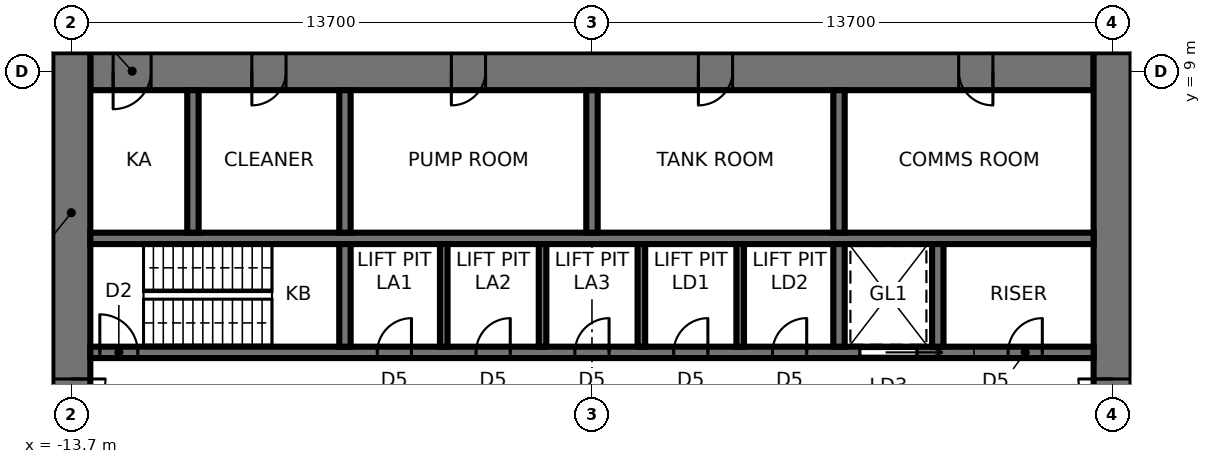
"""IFC4 building model, lengths in metres.
Left out: names, types, materials, properties, quantities, classifications, styles, units other than length and angle.
Written with IfcOpenShell. Run it as: python <this file> out.ifc"""

import sys

from ifc_helpers import new_model, si_unit, direction, frame, frame_2d, origin, place, context, subcontext, project, spatial, rectangle, extrude, element, fill, save


model = new_model("IFC4")
c1 = context("Model", 3, precision=1e-05, world=origin(), true_north=direction((0.0, 1.0)))
c2 = subcontext(c1, "Body", "Model", "MODEL_VIEW")
j1 = project(units=[si_unit("LENGTHUNIT", "METRE"), si_unit("PLANEANGLEUNIT", "RADIAN")], contexts=[c1])
p1 = place(None, origin())
s1 = spatial("IfcSite", under=j1, at=p1, CompositionType="ELEMENT")
p2 = place(p1, origin())
s2 = spatial("IfcBuilding", under=s1, at=p2, CompositionType="ELEMENT")
p3 = place(p2, frame((0.0, 0.0, -5.0)))
s3 = spatial("IfcBuildingStorey", under=s2, at=p3, CompositionType="ELEMENT", Elevation=-5.0)
p4 = place(p3, frame((13.2, 9.0, -0.15), z_axis=(0.0, 0.0, 1.0), x_axis=(-1.0, 0.0, 0.0)))
e1 = element("IfcWall", 1, at=p4, inside=s3, PredefinedType="SHEAR", context=c2, shape_type="SweptSolid", body=[
    extrude(rectangle(XDim=26.4, YDim=1.0, at=frame_2d((13.2, 0.0))), origin(), (0.0, 0.0, 1.0), 5.15),
])
p5 = place(p4, frame((2.65, 0.0, 0.15)))
e2 = element("IfcOpeningElement", 2, at=p5, cuts=e1, PredefinedType="OPENING", context=c2, shape_type="SweptSolid", body=[
    extrude(rectangle(XDim=0.9, YDim=2.1, at=frame_2d((0.45, 1.05))), frame((0.0, 0.51, 0.0), z_axis=(0.0, -1.0, 0.0), x_axis=(1.0, 0.0, 0.0)), (0.0, 0.0, 1.0), 1.02),
])
p6 = place(p4, frame((9.5, 0.0, 0.15)))
e3 = element("IfcOpeningElement", 3, at=p6, cuts=e1, PredefinedType="OPENING", context=c2, shape_type="SweptSolid", body=[
    extrude(rectangle(XDim=0.9, YDim=2.1, at=frame_2d((0.45, 1.05))), frame((0.0, 0.51, 0.0), z_axis=(0.0, -1.0, 0.0), x_axis=(1.0, 0.0, 0.0)), (0.0, 0.0, 1.0), 1.02),
])
p7 = place(p4, frame((16.0, 0.0, 0.15)))
e4 = element("IfcOpeningElement", 4, at=p7, cuts=e1, PredefinedType="OPENING", context=c2, shape_type="SweptSolid", body=[
    extrude(rectangle(XDim=0.9, YDim=2.1, at=frame_2d((0.45, 1.05))), frame((0.0, 0.51, 0.0), z_axis=(0.0, -1.0, 0.0), x_axis=(1.0, 0.0, 0.0)), (0.0, 0.0, 1.0), 1.02),
])
p8 = place(p4, frame((21.25, 0.0, 0.15)))
e5 = element("IfcOpeningElement", 5, at=p8, cuts=e1, PredefinedType="OPENING", context=c2, shape_type="SweptSolid", body=[
    extrude(rectangle(XDim=0.9, YDim=2.1, at=frame_2d((0.45, 1.05))), frame((0.0, 0.51, 0.0), z_axis=(0.0, -1.0, 0.0), x_axis=(1.0, 0.0, 0.0)), (0.0, 0.0, 1.0), 1.02),
])
p9 = place(p4, frame((24.8, 0.0, 0.15)))
e6 = element("IfcOpeningElement", 6, at=p9, cuts=e1, PredefinedType="OPENING", context=c2, shape_type="SweptSolid", body=[
    extrude(rectangle(XDim=1.0, YDim=2.1, at=frame_2d((0.5, 1.05))), frame((0.0, 0.51, 0.0), z_axis=(0.0, -1.0, 0.0), x_axis=(1.0, 0.0, 0.0)), (0.0, 0.0, 1.0), 1.02),
])
p10 = place(p3, frame((13.7, -9.5, -0.15), z_axis=(0.0, 0.0, 1.0), x_axis=(0.0, 1.0, 0.0)))
e7 = element("IfcWall", 7, at=p10, inside=s3, PredefinedType="SHEAR", context=c2, shape_type="SweptSolid", body=[
    extrude(rectangle(XDim=19.0, YDim=1.0, at=frame_2d((9.5, 0.0))), origin(), (0.0, 0.0, 1.0), 5.15),
])
p11 = place(p10, frame((8.6, 0.0, 0.15)))
e8 = element("IfcOpeningElement", 8, at=p11, cuts=e7, PredefinedType="OPENING", context=c2, shape_type="SweptSolid", body=[
    extrude(rectangle(XDim=1.8, YDim=2.4, at=frame_2d((0.9, 1.2))), frame((0.0, 0.51, 0.0), z_axis=(0.0, -1.0, 0.0), x_axis=(1.0, 0.0, 0.0)), (0.0, 0.0, 1.0), 1.02),
])
p12 = place(p3, frame((-13.7, 9.5, -0.15), z_axis=(0.0, 0.0, 1.0), x_axis=(0.0, -1.0, 0.0)))
e9 = element("IfcWall", 9, at=p12, inside=s3, PredefinedType="SHEAR", context=c2, shape_type="SweptSolid", body=[
    extrude(rectangle(XDim=19.0, YDim=1.0, at=frame_2d((9.5, 0.0))), origin(), (0.0, 0.0, 1.0), 5.15),
])
p13 = place(p12, frame((8.6, 0.0, 0.15)))
e10 = element("IfcOpeningElement", 10, at=p13, cuts=e9, PredefinedType="OPENING", context=c2, shape_type="SweptSolid", body=[
    extrude(rectangle(XDim=1.8, YDim=2.4, at=frame_2d((0.9, 1.2))), frame((0.0, 0.51, 0.0), z_axis=(0.0, -1.0, 0.0), x_axis=(1.0, 0.0, 0.0)), (0.0, 0.0, 1.0), 1.02),
])
p14 = place(p3, frame((-13.2, 1.6, -0.15), z_axis=(0.0, 0.0, 1.0), x_axis=(1.0, 0.0, 0.0)))
e11 = element("IfcWall", 11, at=p14, inside=s3, PredefinedType="SHEAR", context=c2, shape_type="SweptSolid", body=[
    extrude(rectangle(XDim=26.4, YDim=0.3, at=frame_2d((13.2, 0.0))), origin(), (0.0, 0.0, 1.0), 5.15),
])
p15 = place(p14, frame((0.25, 0.0, 0.15)))
e12 = element("IfcOpeningElement", 12, at=p15, cuts=e11, PredefinedType="OPENING", context=c2, shape_type="SweptSolid", body=[
    extrude(rectangle(XDim=1.0, YDim=2.1, at=frame_2d((0.5, 1.05))), frame((0.0, 0.16, 0.0), z_axis=(0.0, -1.0, 0.0), x_axis=(1.0, 0.0, 0.0)), (0.0, 0.0, 1.0), 0.32),
])
p16 = place(p14, frame((20.25, 0.0, 0.15)))
e13 = element("IfcOpeningElement", 13, at=p16, cuts=e11, PredefinedType="OPENING", context=c2, shape_type="SweptSolid", body=[
    extrude(rectangle(XDim=1.5, YDim=2.4, at=frame_2d((0.75, 1.2))), frame((0.0, 0.16, 0.0), z_axis=(0.0, -1.0, 0.0), x_axis=(1.0, 0.0, 0.0)), (0.0, 0.0, 1.0), 0.32),
])
p17 = place(p14, frame((7.55, 0.0, 0.15)))
e14 = element("IfcOpeningElement", 14, at=p17, cuts=e11, PredefinedType="OPENING", context=c2, shape_type="SweptSolid", body=[
    extrude(rectangle(XDim=0.9, YDim=2.1, at=frame_2d((0.45, 1.05))), frame((0.0, 0.16, 0.0), z_axis=(0.0, -1.0, 0.0), x_axis=(1.0, 0.0, 0.0)), (0.0, 0.0, 1.0), 0.32),
])
p18 = place(p14, frame((10.15, 0.0, 0.15)))
e15 = element("IfcOpeningElement", 15, at=p18, cuts=e11, PredefinedType="OPENING", context=c2, shape_type="SweptSolid", body=[
    extrude(rectangle(XDim=0.9, YDim=2.1, at=frame_2d((0.45, 1.05))), frame((0.0, 0.16, 0.0), z_axis=(0.0, -1.0, 0.0), x_axis=(1.0, 0.0, 0.0)), (0.0, 0.0, 1.0), 0.32),
])
p19 = place(p14, frame((12.75, 0.0, 0.15)))
e16 = element("IfcOpeningElement", 16, at=p19, cuts=e11, PredefinedType="OPENING", context=c2, shape_type="SweptSolid", body=[
    extrude(rectangle(XDim=0.9, YDim=2.1, at=frame_2d((0.45, 1.05))), frame((0.0, 0.16, 0.0), z_axis=(0.0, -1.0, 0.0), x_axis=(1.0, 0.0, 0.0)), (0.0, 0.0, 1.0), 0.32),
])
p20 = place(p14, frame((15.35, 0.0, 0.15)))
e17 = element("IfcOpeningElement", 17, at=p20, cuts=e11, PredefinedType="OPENING", context=c2, shape_type="SweptSolid", body=[
    extrude(rectangle(XDim=0.9, YDim=2.1, at=frame_2d((0.45, 1.05))), frame((0.0, 0.16, 0.0), z_axis=(0.0, -1.0, 0.0), x_axis=(1.0, 0.0, 0.0)), (0.0, 0.0, 1.0), 0.32),
])
p21 = place(p14, frame((17.95, 0.0, 0.15)))
e18 = element("IfcOpeningElement", 18, at=p21, cuts=e11, PredefinedType="OPENING", context=c2, shape_type="SweptSolid", body=[
    extrude(rectangle(XDim=0.9, YDim=2.1, at=frame_2d((0.45, 1.05))), frame((0.0, 0.16, 0.0), z_axis=(0.0, -1.0, 0.0), x_axis=(1.0, 0.0, 0.0)), (0.0, 0.0, 1.0), 0.32),
])
p22 = place(p14, frame((24.15, 0.0, 0.15)))
e19 = element("IfcOpeningElement", 19, at=p22, cuts=e11, PredefinedType="OPENING", context=c2, shape_type="SweptSolid", body=[
    extrude(rectangle(XDim=0.9, YDim=2.1, at=frame_2d((0.45, 1.05))), frame((0.0, 0.16, 0.0), z_axis=(0.0, -1.0, 0.0), x_axis=(1.0, 0.0, 0.0)), (0.0, 0.0, 1.0), 0.32),
])
p23 = place(p3, frame((-13.2, 4.6, -0.15), z_axis=(0.0, 0.0, 1.0), x_axis=(1.0, 0.0, 0.0)))
e20 = element("IfcWall", 20, at=p23, inside=s3, PredefinedType="SHEAR", context=c2, shape_type="SweptSolid", body=[
    extrude(rectangle(XDim=26.4, YDim=0.3, at=frame_2d((13.2, 0.0))), origin(), (0.0, 0.0, 1.0), 5.15),
])
p24 = place(p3, frame((-6.5, 1.75, -0.15), z_axis=(0.0, 0.0, 1.0), x_axis=(0.0, 1.0, 0.0)))
e21 = element("IfcWall", 21, at=p24, inside=s3, PredefinedType="SHEAR", context=c2, shape_type="SweptSolid", body=[
    extrude(rectangle(XDim=2.7, YDim=0.3, at=frame_2d((1.35, 0.0))), origin(), (0.0, 0.0, 1.0), 5.15),
])
p25 = place(p3, frame((-6.5, 4.75, -0.15), z_axis=(0.0, 0.0, 1.0), x_axis=(0.0, 1.0, 0.0)))
e22 = element("IfcWall", 22, at=p25, inside=s3, PredefinedType="SHEAR", context=c2, shape_type="SweptSolid", body=[
    extrude(rectangle(XDim=3.75, YDim=0.3, at=frame_2d((1.875, 0.0))), origin(), (0.0, 0.0, 1.0), 5.15),
])
p26 = place(p3, frame((6.5, 1.75, -0.15), z_axis=(0.0, 0.0, 1.0), x_axis=(0.0, 1.0, 0.0)))
e23 = element("IfcWall", 23, at=p26, inside=s3, PredefinedType="SHEAR", context=c2, shape_type="SweptSolid", body=[
    extrude(rectangle(XDim=2.7, YDim=0.3, at=frame_2d((1.35, 0.0))), origin(), (0.0, 0.0, 1.0), 5.15),
])
p27 = place(p3, frame((6.5, 4.75, -0.15), z_axis=(0.0, 0.0, 1.0), x_axis=(0.0, 1.0, 0.0)))
e24 = element("IfcWall", 24, at=p27, inside=s3, PredefinedType="SHEAR", context=c2, shape_type="SweptSolid", body=[
    extrude(rectangle(XDim=3.75, YDim=0.3, at=frame_2d((1.875, 0.0))), origin(), (0.0, 0.0, 1.0), 5.15),
])
for number, where, z_axis, x_axis in (
    (25, (-3.9, 1.75, -0.15), (0.0, 0.0, 1.0), (0.0, 1.0, 0.0)),
    (26, (-1.3, 1.75, -0.15), (0.0, 0.0, 1.0), (0.0, 1.0, 0.0)),
    (27, (1.3, 1.75, -0.15), (0.0, 0.0, 1.0), (0.0, 1.0, 0.0)),
    (28, (3.9, 1.75, -0.15), (0.0, 0.0, 1.0), (0.0, 1.0, 0.0)),
):
    element("IfcWall", number, at=place(p3, frame(where, z_axis=z_axis, x_axis=x_axis)), inside=s3, PredefinedType="SHEAR", context=c2, shape_type="SweptSolid", body=[
        extrude(rectangle(XDim=2.7, YDim=0.2, at=frame_2d((1.35, 0.0))), origin(), (0.0, 0.0, 1.0), 5.15),
    ])
for number, where, z_axis, x_axis in (
    (29, (0.0, 4.75, -0.15), (0.0, 0.0, 1.0), (0.0, 1.0, 0.0)),
    (30, (-10.5, 4.75, -0.15), (0.0, 0.0, 1.0), (0.0, 1.0, 0.0)),
):
    element("IfcWall", number, at=place(p3, frame(where, z_axis=z_axis, x_axis=x_axis)), inside=s3, PredefinedType="SHEAR", context=c2, shape_type="SweptSolid", body=[
        extrude(rectangle(XDim=3.75, YDim=0.3, at=frame_2d((1.875, 0.0))), origin(), (0.0, 0.0, 1.0), 5.15),
    ])
p28 = place(p3, frame((9.1, 1.75, -0.15), z_axis=(0.0, 0.0, 1.0), x_axis=(0.0, 1.0, 0.0)))
e31 = element("IfcWall", 31, at=p28, inside=s3, PredefinedType="SHEAR", context=c2, shape_type="SweptSolid", body=[
    extrude(rectangle(XDim=2.7, YDim=0.3, at=frame_2d((1.35, 0.0))), origin(), (0.0, 0.0, 1.0), 5.15),
])
p29 = place(p13, origin())
e32 = element("IfcDoor", 32, at=p29, inside=s3, OperationType="DOUBLE_DOOR_SINGLE_SWING", PredefinedType="DOOR", context=c2, shape_type="SweptSolid", body=[
    extrude(rectangle(XDim=1.72, YDim=2.36, at=frame_2d((0.9, 1.18))), frame((0.0, 0.025, 0.0), z_axis=(0.0, -1.0, 0.0), x_axis=(1.0, 0.0, 0.0)), (0.0, 0.0, 1.0), 0.05),
    extrude(rectangle(XDim=0.04, YDim=2.4, at=frame_2d((0.02, 1.2))), frame((0.0, 0.25, 0.0), z_axis=(0.0, -1.0, 0.0), x_axis=(1.0, 0.0, 0.0)), (0.0, 0.0, 1.0), 0.5),
    extrude(rectangle(XDim=0.04, YDim=2.4, at=frame_2d((1.78, 1.2))), frame((0.0, 0.25, 0.0), z_axis=(0.0, -1.0, 0.0), x_axis=(1.0, 0.0, 0.0)), (0.0, 0.0, 1.0), 0.5),
    extrude(rectangle(XDim=1.72, YDim=0.04, at=frame_2d((0.9, 2.38))), frame((0.0, 0.25, 0.0), z_axis=(0.0, -1.0, 0.0), x_axis=(1.0, 0.0, 0.0)), (0.0, 0.0, 1.0), 0.5),
])
fill(e10, e32)
p30 = place(p11, origin())
e33 = element("IfcDoor", 33, at=p30, inside=s3, OperationType="DOUBLE_DOOR_SINGLE_SWING", PredefinedType="DOOR", context=c2, shape_type="SweptSolid", body=[
    extrude(rectangle(XDim=1.72, YDim=2.36, at=frame_2d((0.9, 1.18))), frame((0.0, 0.025, 0.0), z_axis=(0.0, -1.0, 0.0), x_axis=(1.0, 0.0, 0.0)), (0.0, 0.0, 1.0), 0.05),
    extrude(rectangle(XDim=0.04, YDim=2.4, at=frame_2d((0.02, 1.2))), frame((0.0, 0.25, 0.0), z_axis=(0.0, -1.0, 0.0), x_axis=(1.0, 0.0, 0.0)), (0.0, 0.0, 1.0), 0.5),
    extrude(rectangle(XDim=0.04, YDim=2.4, at=frame_2d((1.78, 1.2))), frame((0.0, 0.25, 0.0), z_axis=(0.0, -1.0, 0.0), x_axis=(1.0, 0.0, 0.0)), (0.0, 0.0, 1.0), 0.5),
    extrude(rectangle(XDim=1.72, YDim=0.04, at=frame_2d((0.9, 2.38))), frame((0.0, 0.25, 0.0), z_axis=(0.0, -1.0, 0.0), x_axis=(1.0, 0.0, 0.0)), (0.0, 0.0, 1.0), 0.5),
])
fill(e8, e33)
p31 = place(p15, origin())
e34 = element("IfcDoor", 34, at=p31, inside=s3, OperationType="SINGLE_SWING_LEFT", PredefinedType="DOOR", context=c2, shape_type="SweptSolid", body=[
    extrude(rectangle(XDim=1.0, YDim=2.1, at=frame_2d((0.5, 1.05))), frame((0.0, 0.025, 0.0), z_axis=(0.0, -1.0, 0.0), x_axis=(1.0, 0.0, 0.0)), (0.0, 0.0, 1.0), 0.05),
])
fill(e12, e34)
p32 = place(p16, origin())
e35 = element("IfcDoor", 35, at=p32, inside=s3, OperationType="SLIDING_TO_RIGHT", PredefinedType="DOOR", context=c2, shape_type="SweptSolid", body=[
    extrude(rectangle(XDim=1.5, YDim=2.4, at=frame_2d((0.75, 1.2))), frame((0.0, 0.025, 0.0), z_axis=(0.0, -1.0, 0.0), x_axis=(1.0, 0.0, 0.0)), (0.0, 0.0, 1.0), 0.05),
])
fill(e13, e35)
p33 = place(p17, origin())
e36 = element("IfcDoor", 36, at=p33, inside=s3, OperationType="SINGLE_SWING_RIGHT", PredefinedType="DOOR", context=c2, shape_type="SweptSolid", body=[
    extrude(rectangle(XDim=0.9, YDim=2.1, at=frame_2d((0.45, 1.05))), frame((0.0, 0.025, 0.0), z_axis=(0.0, -1.0, 0.0), x_axis=(1.0, 0.0, 0.0)), (0.0, 0.0, 1.0), 0.05),
])
fill(e14, e36)
p34 = place(p18, origin())
e37 = element("IfcDoor", 37, at=p34, inside=s3, OperationType="SINGLE_SWING_RIGHT", PredefinedType="DOOR", context=c2, shape_type="SweptSolid", body=[
    extrude(rectangle(XDim=0.9, YDim=2.1, at=frame_2d((0.45, 1.05))), frame((0.0, 0.025, 0.0), z_axis=(0.0, -1.0, 0.0), x_axis=(1.0, 0.0, 0.0)), (0.0, 0.0, 1.0), 0.05),
])
fill(e15, e37)
p35 = place(p19, origin())
e38 = element("IfcDoor", 38, at=p35, inside=s3, OperationType="SINGLE_SWING_RIGHT", PredefinedType="DOOR", context=c2, shape_type="SweptSolid", body=[
    extrude(rectangle(XDim=0.9, YDim=2.1, at=frame_2d((0.45, 1.05))), frame((0.0, 0.025, 0.0), z_axis=(0.0, -1.0, 0.0), x_axis=(1.0, 0.0, 0.0)), (0.0, 0.0, 1.0), 0.05),
])
fill(e16, e38)
p36 = place(p20, origin())
e39 = element("IfcDoor", 39, at=p36, inside=s3, OperationType="SINGLE_SWING_RIGHT", PredefinedType="DOOR", context=c2, shape_type="SweptSolid", body=[
    extrude(rectangle(XDim=0.9, YDim=2.1, at=frame_2d((0.45, 1.05))), frame((0.0, 0.025, 0.0), z_axis=(0.0, -1.0, 0.0), x_axis=(1.0, 0.0, 0.0)), (0.0, 0.0, 1.0), 0.05),
])
fill(e17, e39)
p37 = place(p21, origin())
e40 = element("IfcDoor", 40, at=p37, inside=s3, OperationType="SINGLE_SWING_RIGHT", PredefinedType="DOOR", context=c2, shape_type="SweptSolid", body=[
    extrude(rectangle(XDim=0.9, YDim=2.1, at=frame_2d((0.45, 1.05))), frame((0.0, 0.025, 0.0), z_axis=(0.0, -1.0, 0.0), x_axis=(1.0, 0.0, 0.0)), (0.0, 0.0, 1.0), 0.05),
])
fill(e18, e40)
p38 = place(p22, origin())
e41 = element("IfcDoor", 41, at=p38, inside=s3, OperationType="SINGLE_SWING_RIGHT", PredefinedType="DOOR", context=c2, shape_type="SweptSolid", body=[
    extrude(rectangle(XDim=0.9, YDim=2.1, at=frame_2d((0.45, 1.05))), frame((0.0, 0.025, 0.0), z_axis=(0.0, -1.0, 0.0), x_axis=(1.0, 0.0, 0.0)), (0.0, 0.0, 1.0), 0.05),
])
fill(e19, e41)
p39 = place(p5, origin())
e42 = element("IfcDoor", 42, at=p39, inside=s3, OperationType="SINGLE_SWING_LEFT", PredefinedType="DOOR", context=c2, shape_type="SweptSolid", body=[
    extrude(rectangle(XDim=0.82, YDim=2.06, at=frame_2d((0.45, 1.03))), frame((0.0, 0.025, 0.0), z_axis=(0.0, -1.0, 0.0), x_axis=(1.0, 0.0, 0.0)), (0.0, 0.0, 1.0), 0.05),
    extrude(rectangle(XDim=0.04, YDim=2.1, at=frame_2d((0.02, 1.05))), frame((0.0, 0.25, 0.0), z_axis=(0.0, -1.0, 0.0), x_axis=(1.0, 0.0, 0.0)), (0.0, 0.0, 1.0), 0.5),
    extrude(rectangle(XDim=0.04, YDim=2.1, at=frame_2d((0.88, 1.05))), frame((0.0, 0.25, 0.0), z_axis=(0.0, -1.0, 0.0), x_axis=(1.0, 0.0, 0.0)), (0.0, 0.0, 1.0), 0.5),
    extrude(rectangle(XDim=0.82, YDim=0.04, at=frame_2d((0.45, 2.08))), frame((0.0, 0.25, 0.0), z_axis=(0.0, -1.0, 0.0), x_axis=(1.0, 0.0, 0.0)), (0.0, 0.0, 1.0), 0.5),
])
fill(e2, e42)
p40 = place(p6, origin())
e43 = element("IfcDoor", 43, at=p40, inside=s3, OperationType="SINGLE_SWING_RIGHT", PredefinedType="DOOR", context=c2, shape_type="SweptSolid", body=[
    extrude(rectangle(XDim=0.82, YDim=2.06, at=frame_2d((0.45, 1.03))), frame((0.0, 0.025, 0.0), z_axis=(0.0, -1.0, 0.0), x_axis=(1.0, 0.0, 0.0)), (0.0, 0.0, 1.0), 0.05),
    extrude(rectangle(XDim=0.04, YDim=2.1, at=frame_2d((0.02, 1.05))), frame((0.0, 0.25, 0.0), z_axis=(0.0, -1.0, 0.0), x_axis=(1.0, 0.0, 0.0)), (0.0, 0.0, 1.0), 0.5),
    extrude(rectangle(XDim=0.04, YDim=2.1, at=frame_2d((0.88, 1.05))), frame((0.0, 0.25, 0.0), z_axis=(0.0, -1.0, 0.0), x_axis=(1.0, 0.0, 0.0)), (0.0, 0.0, 1.0), 0.5),
    extrude(rectangle(XDim=0.82, YDim=0.04, at=frame_2d((0.45, 2.08))), frame((0.0, 0.25, 0.0), z_axis=(0.0, -1.0, 0.0), x_axis=(1.0, 0.0, 0.0)), (0.0, 0.0, 1.0), 0.5),
])
fill(e3, e43)
p41 = place(p7, origin())
e44 = element("IfcDoor", 44, at=p41, inside=s3, OperationType="SINGLE_SWING_RIGHT", PredefinedType="DOOR", context=c2, shape_type="SweptSolid", body=[
    extrude(rectangle(XDim=0.82, YDim=2.06, at=frame_2d((0.45, 1.03))), frame((0.0, 0.025, 0.0), z_axis=(0.0, -1.0, 0.0), x_axis=(1.0, 0.0, 0.0)), (0.0, 0.0, 1.0), 0.05),
    extrude(rectangle(XDim=0.04, YDim=2.1, at=frame_2d((0.02, 1.05))), frame((0.0, 0.25, 0.0), z_axis=(0.0, -1.0, 0.0), x_axis=(1.0, 0.0, 0.0)), (0.0, 0.0, 1.0), 0.5),
    extrude(rectangle(XDim=0.04, YDim=2.1, at=frame_2d((0.88, 1.05))), frame((0.0, 0.25, 0.0), z_axis=(0.0, -1.0, 0.0), x_axis=(1.0, 0.0, 0.0)), (0.0, 0.0, 1.0), 0.5),
    extrude(rectangle(XDim=0.82, YDim=0.04, at=frame_2d((0.45, 2.08))), frame((0.0, 0.25, 0.0), z_axis=(0.0, -1.0, 0.0), x_axis=(1.0, 0.0, 0.0)), (0.0, 0.0, 1.0), 0.5),
])
fill(e4, e44)
p42 = place(p8, origin())
e45 = element("IfcDoor", 45, at=p42, inside=s3, OperationType="SINGLE_SWING_RIGHT", PredefinedType="DOOR", context=c2, shape_type="SweptSolid", body=[
    extrude(rectangle(XDim=0.82, YDim=2.06, at=frame_2d((0.45, 1.03))), frame((0.0, 0.025, 0.0), z_axis=(0.0, -1.0, 0.0), x_axis=(1.0, 0.0, 0.0)), (0.0, 0.0, 1.0), 0.05),
    extrude(rectangle(XDim=0.04, YDim=2.1, at=frame_2d((0.02, 1.05))), frame((0.0, 0.25, 0.0), z_axis=(0.0, -1.0, 0.0), x_axis=(1.0, 0.0, 0.0)), (0.0, 0.0, 1.0), 0.5),
    extrude(rectangle(XDim=0.04, YDim=2.1, at=frame_2d((0.88, 1.05))), frame((0.0, 0.25, 0.0), z_axis=(0.0, -1.0, 0.0), x_axis=(1.0, 0.0, 0.0)), (0.0, 0.0, 1.0), 0.5),
    extrude(rectangle(XDim=0.82, YDim=0.04, at=frame_2d((0.45, 2.08))), frame((0.0, 0.25, 0.0), z_axis=(0.0, -1.0, 0.0), x_axis=(1.0, 0.0, 0.0)), (0.0, 0.0, 1.0), 0.5),
])
fill(e5, e45)
p43 = place(p9, origin())
e46 = element("IfcDoor", 46, at=p43, inside=s3, OperationType="SINGLE_SWING_RIGHT", PredefinedType="DOOR", context=c2, shape_type="SweptSolid", body=[
    extrude(rectangle(XDim=0.92, YDim=2.06, at=frame_2d((0.5, 1.03))), frame((0.0, 0.025, 0.0), z_axis=(0.0, -1.0, 0.0), x_axis=(1.0, 0.0, 0.0)), (0.0, 0.0, 1.0), 0.05),
    extrude(rectangle(XDim=0.04, YDim=2.1, at=frame_2d((0.02, 1.05))), frame((0.0, 0.25, 0.0), z_axis=(0.0, -1.0, 0.0), x_axis=(1.0, 0.0, 0.0)), (0.0, 0.0, 1.0), 0.5),
    extrude(rectangle(XDim=0.04, YDim=2.1, at=frame_2d((0.98, 1.05))), frame((0.0, 0.25, 0.0), z_axis=(0.0, -1.0, 0.0), x_axis=(1.0, 0.0, 0.0)), (0.0, 0.0, 1.0), 0.5),
    extrude(rectangle(XDim=0.92, YDim=0.04, at=frame_2d((0.5, 2.08))), frame((0.0, 0.25, 0.0), z_axis=(0.0, -1.0, 0.0), x_axis=(1.0, 0.0, 0.0)), (0.0, 0.0, 1.0), 0.5),
])
fill(e6, e46)
save(model, sys.argv[1])
